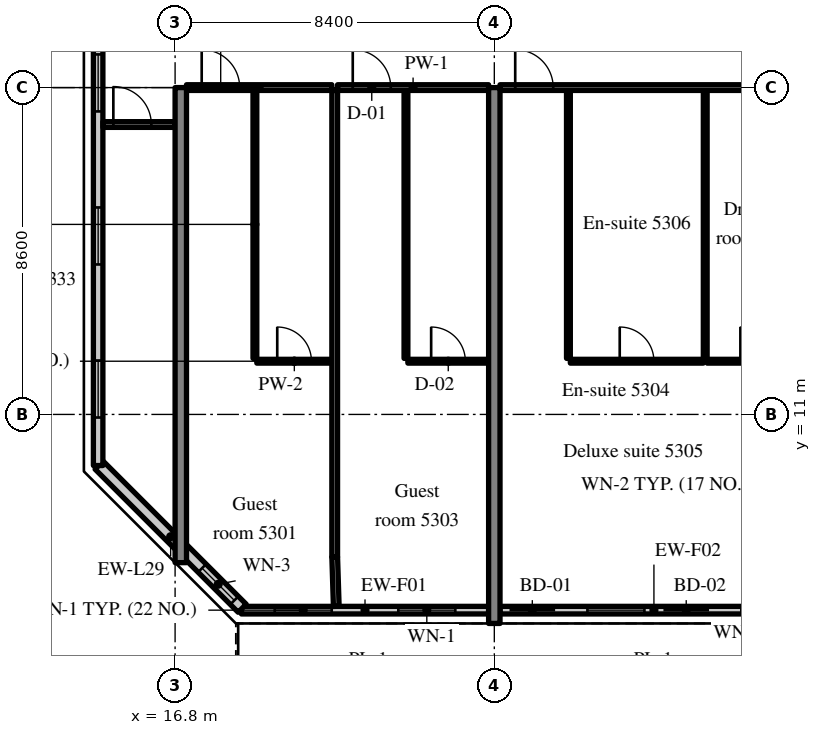
"""IFC4 building model, lengths in metres.
Left out: names, types, materials, properties, quantities, classifications, styles, units other than length and angle.
Written with IfcOpenShell. Run it as: python <this file> out.ifc"""

import sys

from ifc_helpers import new_model, si_unit, direction, frame, frame_2d, origin, place, context, subcontext, project, spatial, rectangle, extrude, source, transform, mapped, element, fill, save


model = new_model("IFC4")
c1 = context("Model", 3, precision=1e-05, world=origin(), true_north=direction((0.0, 1.0)))
c2 = subcontext(c1, "Body", "Model", "MODEL_VIEW")
j1 = project(units=[si_unit("LENGTHUNIT", "METRE"), si_unit("PLANEANGLEUNIT", "RADIAN")], contexts=[c1])
p1 = place(None, origin())
s1 = spatial("IfcSite", under=j1, at=p1, CompositionType="ELEMENT")
p2 = place(p1, origin())
s2 = spatial("IfcBuilding", under=s1, at=p2, CompositionType="ELEMENT")
p3 = place(p2, frame((0.0, 0.0, 221.8)))
s3 = spatial("IfcBuildingStorey", under=s2, at=p3, CompositionType="ELEMENT", Elevation=221.8)
m1 = source(origin(), c2, "Body", "SweptSolid", [
    extrude(rectangle(XDim=12.5, YDim=0.3, at=frame_2d((6.25, 0.0))), origin(), (0.0, 0.0, 1.0), 3.62),
])
p4 = place(p3, frame((16.95, 7.1, 0.0), z_axis=(0.0, 0.0, 1.0), x_axis=(0.0, 1.0, 0.0)))
e1 = element("IfcWall", 1, at=p4, inside=s3, PredefinedType="SHEAR", context=c2, shape_type="MappedRepresentation", body=[
    mapped(m1, transform((0.0, 0.0, 0.0), scale=1.0)),
])
m2 = source(origin(), c2, "Body", "SweptSolid", [
    extrude(rectangle(XDim=14.1, YDim=0.3, at=frame_2d((7.05, 0.0))), origin(), (0.0, 0.0, 1.0), 3.62),
])
p5 = place(p3, frame((25.2, 5.5, 0.0), z_axis=(0.0, 0.0, 1.0), x_axis=(0.0, 1.0, 0.0)))
e2 = element("IfcWall", 2, at=p5, inside=s3, PredefinedType="SHEAR", context=c2, shape_type="MappedRepresentation", body=[
    mapped(m2, transform((0.0, 0.0, 0.0), scale=1.0)),
])
m3 = source(origin(), c2, "Body", "SweptSolid", [
    extrude(rectangle(XDim=6.505, YDim=0.2, at=frame_2d((3.252, 0.0))), origin(), (0.0, 0.0, 1.0), 3.02),
])
p6 = place(p3, frame((18.545, 5.85, 0.0), z_axis=(0.0, 0.0, 1.0), x_axis=(1.0, 0.0, 0.0)))
e3 = element("IfcWall", 3, at=p6, inside=s3, PredefinedType="SOLIDWALL", context=c2, shape_type="MappedRepresentation", body=[
    mapped(m3, transform((0.0, 0.0, 0.0), scale=1.0)),
])
m4 = source(origin(), c2, "Body", "SweptSolid", [
    extrude(rectangle(XDim=1.5, YDim=1.5, at=frame_2d((0.75, 0.75))), frame((0.0, 0.11, 0.0), z_axis=(0.0, -1.0, 0.0), x_axis=(1.0, 0.0, 0.0)), (0.0, 0.0, 1.0), 0.22),
])
p7 = place(p6, frame((0.876, 0.0, 0.9)))
e4 = element("IfcOpeningElement", 4, at=p7, cuts=e3, PredefinedType="OPENING", context=c2, shape_type="MappedRepresentation", body=[
    mapped(m4, transform((0.0, 0.0, 0.0), scale=1.0)),
])
p8 = place(p6, frame((4.129, 0.0, 0.9)))
e5 = element("IfcOpeningElement", 5, at=p8, cuts=e3, PredefinedType="OPENING", context=c2, shape_type="MappedRepresentation", body=[
    mapped(m4, transform((0.0, 0.0, 0.0), scale=1.0)),
])
m5 = source(origin(), c2, "Body", "SweptSolid", [
    extrude(rectangle(XDim=8.1, YDim=0.2, at=frame_2d((4.05, 0.0))), origin(), (0.0, 0.0, 1.0), 3.02),
])
p9 = place(p3, frame((25.35, 5.85, 0.0), z_axis=(0.0, 0.0, 1.0), x_axis=(1.0, 0.0, 0.0)))
e6 = element("IfcWall", 6, at=p9, inside=s3, PredefinedType="SOLIDWALL", context=c2, shape_type="MappedRepresentation", body=[
    mapped(m5, transform((0.0, 0.0, 0.0), scale=1.0)),
])
m6 = source(origin(), c2, "Body", "SweptSolid", [
    extrude(rectangle(XDim=1.2, YDim=2.4, at=frame_2d((0.6, 1.2))), frame((0.0, 0.11, 0.0), z_axis=(0.0, -1.0, 0.0), x_axis=(1.0, 0.0, 0.0)), (0.0, 0.0, 1.0), 0.22),
])
p10 = place(p9, frame((0.25, 0.0, 0.0)))
e7 = element("IfcOpeningElement", 7, at=p10, cuts=e6, PredefinedType="OPENING", context=c2, shape_type="MappedRepresentation", body=[
    mapped(m6, transform((0.0, 0.0, 0.0), scale=1.0)),
])
p11 = place(p9, frame((2.3, 0.0, 0.9)))
e8 = element("IfcOpeningElement", 8, at=p11, cuts=e6, PredefinedType="OPENING", context=c2, shape_type="MappedRepresentation", body=[
    mapped(m4, transform((0.0, 0.0, 0.0), scale=1.0)),
])
p12 = place(p9, frame((4.3, 0.0, 0.0)))
e9 = element("IfcOpeningElement", 9, at=p12, cuts=e6, PredefinedType="OPENING", context=c2, shape_type="MappedRepresentation", body=[
    mapped(m6, transform((0.0, 0.0, 0.0), scale=1.0)),
])
p13 = place(p9, frame((6.35, 0.0, 0.9)))
e10 = element("IfcOpeningElement", 10, at=p13, cuts=e6, PredefinedType="OPENING", context=c2, shape_type="MappedRepresentation", body=[
    mapped(m4, transform((0.0, 0.0, 0.0), scale=1.0)),
])
m7 = source(origin(), c2, "Body", "SweptSolid", [
    extrude(rectangle(XDim=5.326, YDim=0.3, at=frame_2d((2.663, 0.0))), origin(), (0.0, 0.0, 1.0), 3.62),
])
p14 = place(p3, frame((14.8, 9.666, 0.0), z_axis=(0.0, 0.0, 1.0), x_axis=(0.707083859269, -0.707129702361, 0.0)))
e11 = element("IfcWall", 11, at=p14, inside=s3, PredefinedType="SOLIDWALL", context=c2, shape_type="MappedRepresentation", body=[
    mapped(m7, transform((0.0, 0.0, 0.0), scale=1.0)),
])
m8 = source(origin(), c2, "Body", "SweptSolid", [
    extrude(rectangle(XDim=1.2, YDim=1.5, at=frame_2d((0.6, 0.75))), frame((0.0, 0.16, 0.0), z_axis=(0.0, -1.0, 0.0), x_axis=(1.0, 0.0, 0.0)), (0.0, 0.0, 1.0), 0.32),
])
p15 = place(p14, frame((3.833, 0.0, 0.9)))
e12 = element("IfcOpeningElement", 12, at=p15, cuts=e11, PredefinedType="OPENING", context=c2, shape_type="MappedRepresentation", body=[
    mapped(m8, transform((0.0, 0.0, 0.0), scale=1.0)),
])
m9 = source(origin(), c2, "Body", "SweptSolid", [
    extrude(rectangle(XDim=28.189, YDim=0.25, at=frame_2d((14.095, 0.0))), origin(), (0.0, 0.0, 1.0), 3.62),
])
p16 = place(p3, frame((14.775, 37.845, 0.0), z_axis=(0.0, 0.0, 1.0), x_axis=(0.0, -1.0, 0.0)))
e13 = element("IfcWall", 13, at=p16, inside=s3, PredefinedType="SOLIDWALL", context=c2, shape_type="MappedRepresentation", body=[
    mapped(m9, transform((0.0, 0.0, 0.0), scale=1.0)),
])
m10 = source(origin(), c2, "Body", "SweptSolid", [
    extrude(rectangle(XDim=1.5, YDim=1.5, at=frame_2d((0.75, 0.75))), frame((0.0, 0.135, 0.0), z_axis=(0.0, -1.0, 0.0), x_axis=(1.0, 0.0, 0.0)), (0.0, 0.0, 1.0), 0.27),
])
p17 = place(p16, frame((1.263, 0.0, 0.9)))
e14 = element("IfcOpeningElement", 14, at=p17, cuts=e13, PredefinedType="OPENING", context=c2, shape_type="MappedRepresentation", body=[
    mapped(m10, transform((0.0, 0.0, 0.0), scale=1.0)),
])
p18 = place(p16, frame((5.291, 0.0, 0.9)))
e15 = element("IfcOpeningElement", 15, at=p18, cuts=e13, PredefinedType="OPENING", context=c2, shape_type="MappedRepresentation", body=[
    mapped(m10, transform((0.0, 0.0, 0.0), scale=1.0)),
])
p19 = place(p16, frame((9.318, 0.0, 0.9)))
e16 = element("IfcOpeningElement", 16, at=p19, cuts=e13, PredefinedType="OPENING", context=c2, shape_type="MappedRepresentation", body=[
    mapped(m10, transform((0.0, 0.0, 0.0), scale=1.0)),
])
p20 = place(p16, frame((13.345, 0.0, 0.9)))
e17 = element("IfcOpeningElement", 17, at=p20, cuts=e13, PredefinedType="OPENING", context=c2, shape_type="MappedRepresentation", body=[
    mapped(m10, transform((0.0, 0.0, 0.0), scale=1.0)),
])
p21 = place(p16, frame((17.372, 0.0, 0.9)))
e18 = element("IfcOpeningElement", 18, at=p21, cuts=e13, PredefinedType="OPENING", context=c2, shape_type="MappedRepresentation", body=[
    mapped(m10, transform((0.0, 0.0, 0.0), scale=1.0)),
])
p22 = place(p16, frame((21.399, 0.0, 0.9)))
e19 = element("IfcOpeningElement", 19, at=p22, cuts=e13, PredefinedType="OPENING", context=c2, shape_type="MappedRepresentation", body=[
    mapped(m10, transform((0.0, 0.0, 0.0), scale=1.0)),
])
p23 = place(p16, frame((25.426, 0.0, 0.9)))
e20 = element("IfcOpeningElement", 20, at=p23, cuts=e13, PredefinedType="OPENING", context=c2, shape_type="MappedRepresentation", body=[
    mapped(m10, transform((0.0, 0.0, 0.0), scale=1.0)),
])
m11 = source(origin(), c2, "Body", "SweptSolid", [
    extrude(rectangle(XDim=7.05, YDim=0.1, at=frame_2d((3.525, 0.0))), origin(), (0.0, 0.0, 1.0), 3.62),
])
p24 = place(p3, frame((18.9, 12.475, 0.0), z_axis=(0.0, 0.0, 1.0), x_axis=(0.0, 1.0, 0.0)))
e21 = element("IfcWall", 21, at=p24, inside=s3, PredefinedType="PARTITIONING", context=c2, shape_type="MappedRepresentation", body=[
    mapped(m11, transform((0.0, 0.0, 0.0), scale=1.0)),
])
m12 = source(origin(), c2, "Body", "SweptSolid", [
    extrude(rectangle(XDim=1.975, YDim=0.1, at=frame_2d((0.988, 0.0))), origin(), (0.0, 0.0, 1.0), 3.62),
])
p25 = place(p3, frame((18.95, 12.4, 0.0), z_axis=(0.0, 0.0, 1.0), x_axis=(1.0, 0.0, 0.0)))
e22 = element("IfcWall", 22, at=p25, inside=s3, PredefinedType="PARTITIONING", context=c2, shape_type="MappedRepresentation", body=[
    mapped(m12, transform((0.0, 0.0, 0.0), scale=1.0)),
])
m13 = source(origin(), c2, "Body", "SweptSolid", [
    extrude(rectangle(XDim=0.9, YDim=2.1, at=frame_2d((0.45, 1.05))), frame((0.0, 0.06, 0.0), z_axis=(0.0, -1.0, 0.0), x_axis=(1.0, 0.0, 0.0)), (0.0, 0.0, 1.0), 0.12),
])
p26 = place(p25, frame((0.538, 0.0, 0.0)))
e23 = element("IfcOpeningElement", 23, at=p26, cuts=e22, PredefinedType="OPENING", context=c2, shape_type="MappedRepresentation", body=[
    mapped(m13, transform((0.0, 0.0, 0.0), scale=1.0)),
])
m14 = source(origin(), c2, "Body", "SweptSolid", [
    extrude(rectangle(XDim=3.825, YDim=0.15, at=frame_2d((1.913, 0.0))), origin(), (0.0, 0.0, 1.0), 2.92),
])
p27 = place(p3, frame((17.1, 19.6, 0.0), z_axis=(0.0, 0.0, 1.0), x_axis=(1.0, 0.0, 0.0)))
e24 = element("IfcWall", 24, at=p27, inside=s3, PredefinedType="PARTITIONING", context=c2, shape_type="MappedRepresentation", body=[
    mapped(m14, transform((0.0, 0.0, 0.0), scale=1.0)),
])
m15 = source(origin(), c2, "Body", "SweptSolid", [
    extrude(rectangle(XDim=1.0, YDim=2.1, at=frame_2d((0.5, 1.05))), frame((0.0, 0.085, 0.0), z_axis=(0.0, -1.0, 0.0), x_axis=(1.0, 0.0, 0.0)), (0.0, 0.0, 1.0), 0.17),
])
p28 = place(p27, frame((0.4, 0.0, 0.0)))
e25 = element("IfcOpeningElement", 25, at=p28, cuts=e24, PredefinedType="OPENING", context=c2, shape_type="MappedRepresentation", body=[
    mapped(m15, transform((0.0, 0.0, 0.0), scale=1.0)),
])
p29 = place(p3, frame((22.875, 12.475, 0.0), z_axis=(0.0, 0.0, 1.0), x_axis=(0.0, 1.0, 0.0)))
e26 = element("IfcWall", 26, at=p29, inside=s3, PredefinedType="PARTITIONING", context=c2, shape_type="MappedRepresentation", body=[
    mapped(m11, transform((0.0, 0.0, 0.0), scale=1.0)),
])
m16 = source(origin(), c2, "Body", "SweptSolid", [
    extrude(rectangle(XDim=2.125, YDim=0.1, at=frame_2d((1.062, 0.0))), origin(), (0.0, 0.0, 1.0), 3.62),
])
p30 = place(p3, frame((22.925, 12.4, 0.0), z_axis=(0.0, 0.0, 1.0), x_axis=(1.0, 0.0, 0.0)))
e27 = element("IfcWall", 27, at=p30, inside=s3, PredefinedType="PARTITIONING", context=c2, shape_type="MappedRepresentation", body=[
    mapped(m16, transform((0.0, 0.0, 0.0), scale=1.0)),
])
p31 = place(p30, frame((0.613, 0.0, 0.0)))
e28 = element("IfcOpeningElement", 28, at=p31, cuts=e27, PredefinedType="OPENING", context=c2, shape_type="MappedRepresentation", body=[
    mapped(m13, transform((0.0, 0.0, 0.0), scale=1.0)),
])
m17 = source(origin(), c2, "Body", "SweptSolid", [
    extrude(rectangle(XDim=3.975, YDim=0.15, at=frame_2d((1.988, 0.0))), origin(), (0.0, 0.0, 1.0), 2.92),
])
p32 = place(p3, frame((21.075, 19.6, 0.0), z_axis=(0.0, 0.0, 1.0), x_axis=(1.0, 0.0, 0.0)))
e29 = element("IfcWall", 29, at=p32, inside=s3, PredefinedType="PARTITIONING", context=c2, shape_type="MappedRepresentation", body=[
    mapped(m17, transform((0.0, 0.0, 0.0), scale=1.0)),
])
p33 = place(p32, frame((0.4, 0.0, 0.0)))
e30 = element("IfcOpeningElement", 30, at=p33, cuts=e29, PredefinedType="OPENING", context=c2, shape_type="MappedRepresentation", body=[
    mapped(m15, transform((0.0, 0.0, 0.0), scale=1.0)),
])
m18 = source(origin(), c2, "Body", "SweptSolid", [
    extrude(rectangle(XDim=12.275, YDim=0.15, at=frame_2d((6.137, 0.0))), origin(), (0.0, 0.0, 1.0), 3.62),
])
p34 = place(p3, frame((21.0, 7.25, 0.0), z_axis=(0.0, 0.0, 1.0), x_axis=(0.0, 1.0, 0.0)))
e31 = element("IfcWall", 31, at=p34, inside=s3, PredefinedType="PARTITIONING", context=c2, shape_type="MappedRepresentation", body=[
    mapped(m18, transform((0.0, 0.0, 0.0), scale=1.0)),
])
for number, where, z_axis, x_axis in (
    (32, (27.15, 12.475, 0.0), (0.0, 0.0, 1.0), (0.0, 1.0, 0.0)),
    (33, (30.75, 12.475, 0.0), (0.0, 0.0, 1.0), (0.0, 1.0, 0.0)),
):
    element("IfcWall", number, at=place(p3, frame(where, z_axis=z_axis, x_axis=x_axis)), inside=s3, PredefinedType="PARTITIONING", context=c2, shape_type="MappedRepresentation", body=[
        mapped(m11, transform((0.0, 0.0, 0.0), scale=1.0)),
    ])
m19 = source(origin(), c2, "Body", "SweptSolid", [
    extrude(rectangle(XDim=3.5, YDim=0.1, at=frame_2d((1.75, 0.0))), origin(), (0.0, 0.0, 1.0), 3.62),
])
p35 = place(p3, frame((27.2, 12.4, 0.0), z_axis=(0.0, 0.0, 1.0), x_axis=(1.0, 0.0, 0.0)))
e34 = element("IfcWall", 34, at=p35, inside=s3, PredefinedType="PARTITIONING", context=c2, shape_type="MappedRepresentation", body=[
    mapped(m19, transform((0.0, 0.0, 0.0), scale=1.0)),
])
p36 = place(p35, frame((1.3, 0.0, 0.0)))
e35 = element("IfcOpeningElement", 35, at=p36, cuts=e34, PredefinedType="OPENING", context=c2, shape_type="MappedRepresentation", body=[
    mapped(m13, transform((0.0, 0.0, 0.0), scale=1.0)),
])
m20 = source(origin(), c2, "Body", "SweptSolid", [
    extrude(rectangle(XDim=2.65, YDim=0.1, at=frame_2d((1.325, 0.0))), origin(), (0.0, 0.0, 1.0), 3.62),
])
p37 = place(p3, frame((30.8, 12.4, 0.0), z_axis=(0.0, 0.0, 1.0), x_axis=(1.0, 0.0, 0.0)))
e36 = element("IfcWall", 36, at=p37, inside=s3, PredefinedType="PARTITIONING", context=c2, shape_type="MappedRepresentation", body=[
    mapped(m20, transform((0.0, 0.0, 0.0), scale=1.0)),
])
p38 = place(p37, frame((0.875, 0.0, 0.0)))
e37 = element("IfcOpeningElement", 37, at=p38, cuts=e36, PredefinedType="OPENING", context=c2, shape_type="MappedRepresentation", body=[
    mapped(m13, transform((0.0, 0.0, 0.0), scale=1.0)),
])
m21 = source(origin(), c2, "Body", "SweptSolid", [
    extrude(rectangle(XDim=8.1, YDim=0.15, at=frame_2d((4.05, 0.0))), origin(), (0.0, 0.0, 1.0), 2.92),
])
p39 = place(p3, frame((25.35, 19.6, 0.0), z_axis=(0.0, 0.0, 1.0), x_axis=(1.0, 0.0, 0.0)))
e38 = element("IfcWall", 38, at=p39, inside=s3, PredefinedType="PARTITIONING", context=c2, shape_type="MappedRepresentation", body=[
    mapped(m21, transform((0.0, 0.0, 0.0), scale=1.0)),
])
p40 = place(p39, frame((0.4, 0.0, 0.0)))
e39 = element("IfcOpeningElement", 39, at=p40, cuts=e38, PredefinedType="OPENING", context=c2, shape_type="MappedRepresentation", body=[
    mapped(m15, transform((0.0, 0.0, 0.0), scale=1.0)),
])
m22 = source(origin(), c2, "Body", "SweptSolid", [
    extrude(rectangle(XDim=1.9, YDim=0.15, at=frame_2d((0.95, 0.0))), origin(), (0.0, 0.0, 1.0), 2.92),
])
p41 = place(p3, frame((14.9, 18.628, 0.0), z_axis=(0.0, 0.0, 1.0), x_axis=(1.0, 0.0, 0.0)))
e40 = element("IfcWall", 40, at=p41, inside=s3, PredefinedType="PARTITIONING", context=c2, shape_type="MappedRepresentation", body=[
    mapped(m22, transform((0.0, 0.0, 0.0), scale=1.0)),
])
p42 = place(p41, frame((0.275, 0.0, 0.0)))
e41 = element("IfcOpeningElement", 41, at=p42, cuts=e40, PredefinedType="OPENING", context=c2, shape_type="MappedRepresentation", body=[
    mapped(m15, transform((0.0, 0.0, 0.0), scale=1.0)),
])
m23 = source(origin(), c2, "Body", "SweptSolid", [
    extrude(rectangle(XDim=1.301, YDim=0.15, at=frame_2d((0.65, 0.0))), origin(), (0.0, 0.0, 1.0), 3.62),
])
p43 = place(p3, frame((21.041, 5.95, 0.0), z_axis=(0.0, 0.0, 1.0), x_axis=(-0.031533606063, 0.999502692187, 0.0)))
e42 = element("IfcWall", 42, at=p43, inside=s3, PredefinedType="PARTITIONING", context=c2, shape_type="MappedRepresentation", body=[
    mapped(m23, transform((0.0, 0.0, 0.0), scale=1.0)),
])
m24 = source(origin(), c2, "Body", "SweptSolid", [
    extrude(rectangle(XDim=1.5, YDim=1.5, at=frame_2d((0.75, 0.75))), frame((0.0, 0.03, 0.0), z_axis=(0.0, -1.0, 0.0), x_axis=(1.0, 0.0, 0.0)), (0.0, 0.0, 1.0), 0.06),
])
p44 = place(p7, origin())
e43 = element("IfcWindow", 43, at=p44, inside=s3, PartitioningType="SINGLE_PANEL", PredefinedType="WINDOW", context=c2, shape_type="MappedRepresentation", body=[
    mapped(m24, transform((0.0, 0.0, 0.0), scale=1.0)),
])
fill(e4, e43)
p45 = place(p8, origin())
e44 = element("IfcWindow", 44, at=p45, inside=s3, PartitioningType="SINGLE_PANEL", PredefinedType="WINDOW", context=c2, shape_type="MappedRepresentation", body=[
    mapped(m24, transform((0.0, 0.0, 0.0), scale=1.0)),
])
fill(e5, e44)
m25 = source(origin(), c2, "Body", "SweptSolid", [
    extrude(rectangle(XDim=1.2, YDim=2.4, at=frame_2d((0.6, 1.2))), frame((0.0, 0.025, 0.0), z_axis=(0.0, -1.0, 0.0), x_axis=(1.0, 0.0, 0.0)), (0.0, 0.0, 1.0), 0.05),
])
p46 = place(p10, origin())
e45 = element("IfcDoor", 45, at=p46, inside=s3, OperationType="SLIDING_TO_LEFT", PredefinedType="DOOR", context=c2, shape_type="MappedRepresentation", body=[
    mapped(m25, transform((0.0, 0.0, 0.0), scale=1.0)),
])
fill(e7, e45)
p47 = place(p11, origin())
e46 = element("IfcWindow", 46, at=p47, inside=s3, PartitioningType="SINGLE_PANEL", PredefinedType="WINDOW", context=c2, shape_type="MappedRepresentation", body=[
    mapped(m24, transform((0.0, 0.0, 0.0), scale=1.0)),
])
fill(e8, e46)
p48 = place(p12, origin())
e47 = element("IfcDoor", 47, at=p48, inside=s3, OperationType="SLIDING_TO_RIGHT", PredefinedType="DOOR", context=c2, shape_type="MappedRepresentation", body=[
    mapped(m25, transform((0.0, 0.0, 0.0), scale=1.0)),
])
fill(e9, e47)
m26 = source(origin(), c2, "Body", "SweptSolid", [
    extrude(rectangle(XDim=1.2, YDim=1.5, at=frame_2d((0.6, 0.75))), frame((0.0, 0.03, 0.0), z_axis=(0.0, -1.0, 0.0), x_axis=(1.0, 0.0, 0.0)), (0.0, 0.0, 1.0), 0.06),
])
p49 = place(p15, origin())
e48 = element("IfcWindow", 48, at=p49, inside=s3, PartitioningType="SINGLE_PANEL", PredefinedType="WINDOW", context=c2, shape_type="MappedRepresentation", body=[
    mapped(m26, transform((0.0, 0.0, 0.0), scale=1.0)),
])
fill(e12, e48)
p50 = place(p21, origin())
e49 = element("IfcWindow", 49, at=p50, inside=s3, PartitioningType="SINGLE_PANEL", PredefinedType="WINDOW", context=c2, shape_type="MappedRepresentation", body=[
    mapped(m24, transform((0.0, 0.0, 0.0), scale=1.0)),
])
fill(e18, e49)
p51 = place(p22, origin())
e50 = element("IfcWindow", 50, at=p51, inside=s3, PartitioningType="SINGLE_PANEL", PredefinedType="WINDOW", context=c2, shape_type="MappedRepresentation", body=[
    mapped(m24, transform((0.0, 0.0, 0.0), scale=1.0)),
])
fill(e19, e50)
p52 = place(p23, origin())
e51 = element("IfcWindow", 51, at=p52, inside=s3, PartitioningType="SINGLE_PANEL", PredefinedType="WINDOW", context=c2, shape_type="MappedRepresentation", body=[
    mapped(m24, transform((0.0, 0.0, 0.0), scale=1.0)),
])
fill(e20, e51)
m27 = source(origin(), c2, "Body", "SweptSolid", [
    extrude(rectangle(XDim=0.9, YDim=2.1, at=frame_2d((0.45, 1.05))), frame((0.0, 0.025, 0.0), z_axis=(0.0, -1.0, 0.0), x_axis=(1.0, 0.0, 0.0)), (0.0, 0.0, 1.0), 0.05),
])
p53 = place(p26, origin())
e52 = element("IfcDoor", 52, at=p53, inside=s3, OperationType="SINGLE_SWING_LEFT", PredefinedType="DOOR", context=c2, shape_type="MappedRepresentation", body=[
    mapped(m27, transform((0.0, 0.0, 0.0), scale=1.0)),
])
fill(e23, e52)
m28 = source(origin(), c2, "Body", "SweptSolid", [
    extrude(rectangle(XDim=1.0, YDim=2.1, at=frame_2d((0.5, 1.05))), frame((0.0, 0.025, 0.0), z_axis=(0.0, -1.0, 0.0), x_axis=(1.0, 0.0, 0.0)), (0.0, 0.0, 1.0), 0.05),
])
p54 = place(p28, origin())
e53 = element("IfcDoor", 53, at=p54, inside=s3, OperationType="SINGLE_SWING_LEFT", PredefinedType="DOOR", context=c2, shape_type="MappedRepresentation", body=[
    mapped(m28, transform((0.0, 0.0, 0.0), scale=1.0)),
])
fill(e25, e53)
p55 = place(p31, origin())
e54 = element("IfcDoor", 54, at=p55, inside=s3, OperationType="SINGLE_SWING_LEFT", PredefinedType="DOOR", context=c2, shape_type="MappedRepresentation", body=[
    mapped(m27, transform((0.0, 0.0, 0.0), scale=1.0)),
])
fill(e28, e54)
p56 = place(p33, origin())
e55 = element("IfcDoor", 55, at=p56, inside=s3, OperationType="SINGLE_SWING_LEFT", PredefinedType="DOOR", context=c2, shape_type="MappedRepresentation", body=[
    mapped(m28, transform((0.0, 0.0, 0.0), scale=1.0)),
])
fill(e30, e55)
p57 = place(p36, origin())
e56 = element("IfcDoor", 56, at=p57, inside=s3, OperationType="SINGLE_SWING_LEFT", PredefinedType="DOOR", context=c2, shape_type="MappedRepresentation", body=[
    mapped(m27, transform((0.0, 0.0, 0.0), scale=1.0)),
])
fill(e35, e56)
p58 = place(p40, origin())
e57 = element("IfcDoor", 57, at=p58, inside=s3, OperationType="SINGLE_SWING_LEFT", PredefinedType="DOOR", context=c2, shape_type="MappedRepresentation", body=[
    mapped(m28, transform((0.0, 0.0, 0.0), scale=1.0)),
])
fill(e39, e57)
p59 = place(p42, origin())
e58 = element("IfcDoor", 58, at=p59, inside=s3, OperationType="SINGLE_SWING_LEFT", PredefinedType="DOOR", context=c2, shape_type="MappedRepresentation", body=[
    mapped(m28, transform((0.0, 0.0, 0.0), scale=1.0)),
])
fill(e41, e58)
save(model, sys.argv[1])
